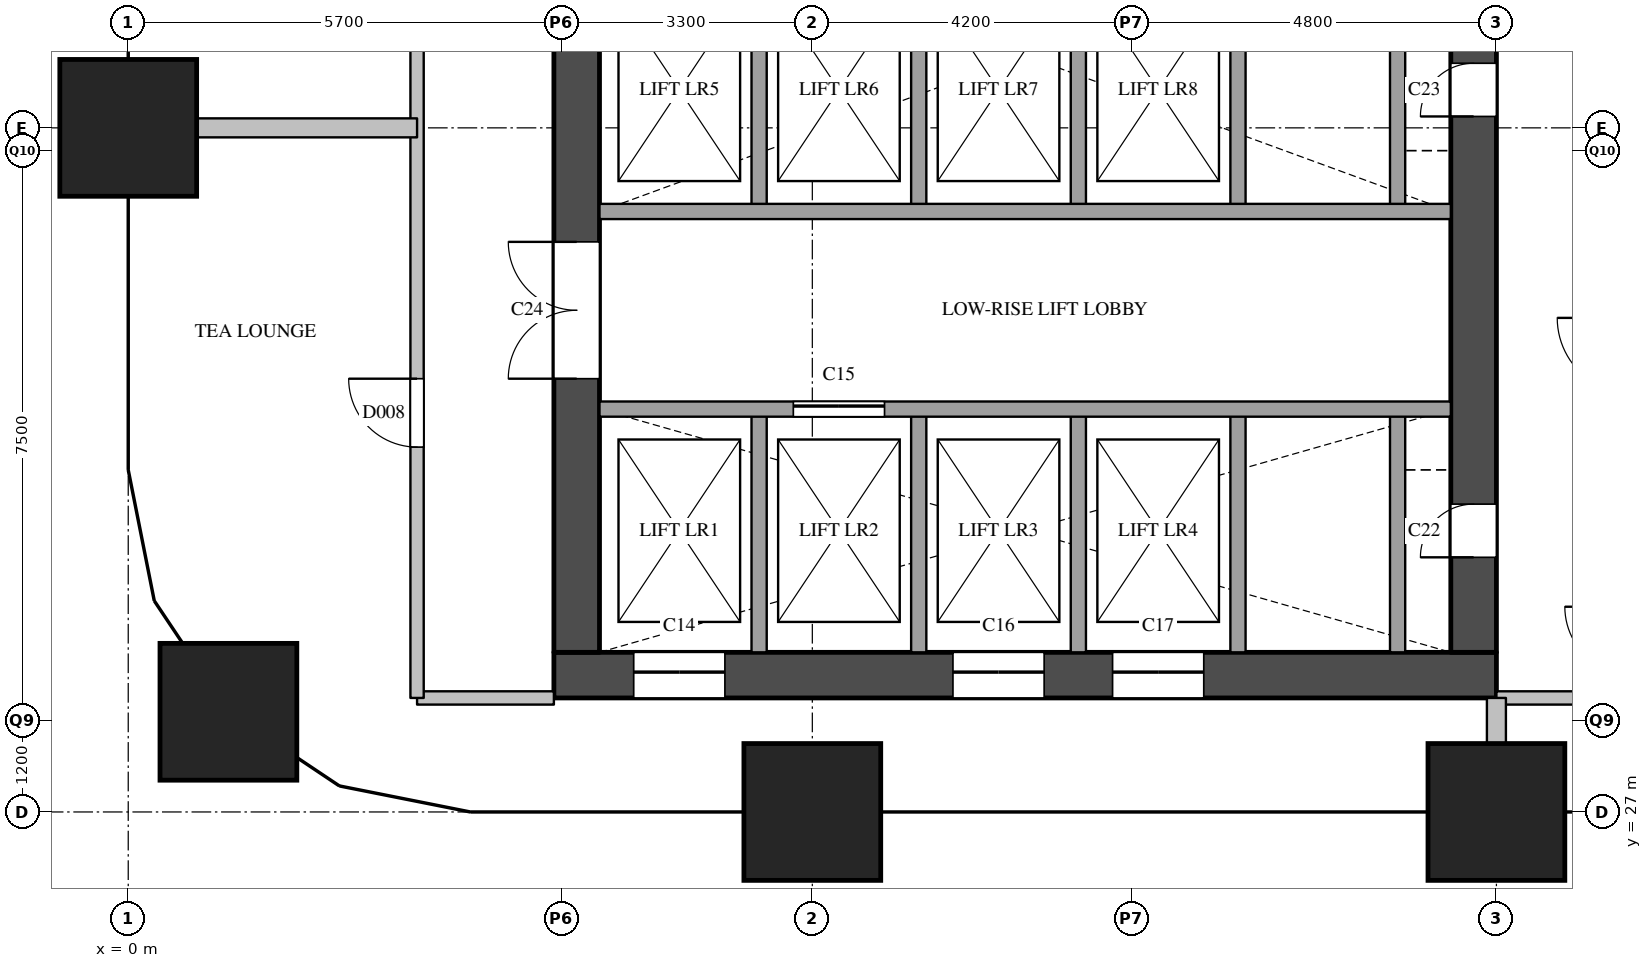
"""IFC4 building model, lengths in metres.
Left out: names, types, materials, properties, quantities, classifications, styles, units other than length and angle.
Written with IfcOpenShell. Run it as: python <this file> out.ifc"""

import sys

from ifc_helpers import new_model, si_unit, direction, frame, frame_2d, origin, origin_2d, place, context, subcontext, project, spatial, rectangle, extrude, element, fill, save


model = new_model("IFC4")
c1 = context("Model", 3, precision=1e-05, world=origin(), true_north=direction((0.0, 1.0)))
c2 = subcontext(c1, "Body", "Model", "MODEL_VIEW")
j1 = project(units=[si_unit("LENGTHUNIT", "METRE"), si_unit("PLANEANGLEUNIT", "RADIAN")], contexts=[c1])
p1 = place(None, origin())
s1 = spatial("IfcSite", under=j1, at=p1, CompositionType="ELEMENT")
p2 = place(p1, origin())
s2 = spatial("IfcBuilding", under=s1, at=p2, CompositionType="ELEMENT")
p3 = place(p2, frame((0.0, 0.0, 115.8)))
s3 = spatial("IfcBuildingStorey", under=s2, at=p3, CompositionType="ELEMENT", Elevation=115.8)
for number, where, z_axis, x_axis in (
    (1, (1.318, 28.318, 0.0), (0.0, 0.0, 1.0), (1.0, 0.0, 0.0)),
    (2, (0.0, 36.0, 0.0), (0.0, 0.0, 1.0), (1.0, 0.0, 0.0)),
    (3, (9.0, 27.0, 0.0), (0.0, 0.0, 1.0), (1.0, 0.0, 0.0)),
    (4, (18.0, 27.0, 0.0), (0.0, 0.0, 1.0), (1.0, 0.0, 0.0)),
):
    element("IfcColumn", number, at=place(p3, frame(where, z_axis=z_axis, x_axis=x_axis)), inside=s3, PredefinedType="COLUMN", context=c2, shape_type="SweptSolid", body=[
        extrude(rectangle(XDim=1.8, YDim=1.8, at=origin_2d()), origin(), (0.0, 0.0, 1.0), 3.8),
    ])
p4 = place(p3, frame((5.6, 28.8, 0.0), z_axis=(0.0, 0.0, 1.0), x_axis=(1.0, 0.0, 0.0)))
e5 = element("IfcWall", 5, at=p4, inside=s3, PredefinedType="SHEAR", context=c2, shape_type="SweptSolid", body=[
    extrude(rectangle(XDim=12.4, YDim=0.6, at=frame_2d((6.2, 0.0))), origin(), (0.0, 0.0, 1.0), 3.5),
])
p5 = place(p4, frame((1.05, 0.0, 0.0)))
e6 = element("IfcOpeningElement", 6, at=p5, cuts=e5, PredefinedType="OPENING", context=c2, shape_type="SweptSolid", body=[
    extrude(rectangle(XDim=1.2, YDim=2.1, at=frame_2d((0.6, 1.05))), frame((0.0, 0.31, 0.0), z_axis=(0.0, -1.0, 0.0), x_axis=(1.0, 0.0, 0.0)), (0.0, 0.0, 1.0), 0.62),
])
p6 = place(p4, frame((5.25, 0.0, 0.0)))
e7 = element("IfcOpeningElement", 7, at=p6, cuts=e5, PredefinedType="OPENING", context=c2, shape_type="SweptSolid", body=[
    extrude(rectangle(XDim=1.2, YDim=2.1, at=frame_2d((0.6, 1.05))), frame((0.0, 0.31, 0.0), z_axis=(0.0, -1.0, 0.0), x_axis=(1.0, 0.0, 0.0)), (0.0, 0.0, 1.0), 0.62),
])
p7 = place(p4, frame((7.35, 0.0, 0.0)))
e8 = element("IfcOpeningElement", 8, at=p7, cuts=e5, PredefinedType="OPENING", context=c2, shape_type="SweptSolid", body=[
    extrude(rectangle(XDim=1.2, YDim=2.1, at=frame_2d((0.6, 1.05))), frame((0.0, 0.31, 0.0), z_axis=(0.0, -1.0, 0.0), x_axis=(1.0, 0.0, 0.0)), (0.0, 0.0, 1.0), 0.62),
])
p8 = place(p3, frame((5.9, 29.1, 0.0), z_axis=(0.0, 0.0, 1.0), x_axis=(0.0, 1.0, 0.0)))
e9 = element("IfcWall", 9, at=p8, inside=s3, PredefinedType="SHEAR", context=c2, shape_type="SweptSolid", body=[
    extrude(rectangle(XDim=20.3, YDim=0.6, at=frame_2d((10.15, 0.0))), origin(), (0.0, 0.0, 1.0), 3.5),
])
p9 = place(p8, frame((3.6, 0.0, 0.0)))
e10 = element("IfcOpeningElement", 10, at=p9, cuts=e9, PredefinedType="OPENING", context=c2, shape_type="SweptSolid", body=[
    extrude(rectangle(XDim=1.8, YDim=2.1, at=frame_2d((0.9, 1.05))), frame((0.0, 0.31, 0.0), z_axis=(0.0, -1.0, 0.0), x_axis=(1.0, 0.0, 0.0)), (0.0, 0.0, 1.0), 0.62),
])
p10 = place(p8, frame((16.4, 0.0, 0.0)))
e11 = element("IfcOpeningElement", 11, at=p10, cuts=e9, PredefinedType="OPENING", context=c2, shape_type="SweptSolid", body=[
    extrude(rectangle(XDim=1.0, YDim=2.1, at=frame_2d((0.5, 1.05))), frame((0.0, 0.31, 0.0), z_axis=(0.0, -1.0, 0.0), x_axis=(1.0, 0.0, 0.0)), (0.0, 0.0, 1.0), 0.62),
])
p11 = place(p3, frame((17.7, 29.1, 0.0), z_axis=(0.0, 0.0, 1.0), x_axis=(0.0, 1.0, 0.0)))
e12 = element("IfcWall", 12, at=p11, inside=s3, PredefinedType="SHEAR", context=c2, shape_type="SweptSolid", body=[
    extrude(rectangle(XDim=20.3, YDim=0.6, at=frame_2d((10.15, 0.0))), origin(), (0.0, 0.0, 1.0), 3.5),
])
p12 = place(p11, frame((1.25, 0.0, 0.0)))
e13 = element("IfcOpeningElement", 13, at=p12, cuts=e12, PredefinedType="OPENING", context=c2, shape_type="SweptSolid", body=[
    extrude(rectangle(XDim=0.7, YDim=2.1, at=frame_2d((0.35, 1.05))), frame((0.0, 0.31, 0.0), z_axis=(0.0, -1.0, 0.0), x_axis=(1.0, 0.0, 0.0)), (0.0, 0.0, 1.0), 0.62),
])
p13 = place(p11, frame((7.05, 0.0, 0.0)))
e14 = element("IfcOpeningElement", 14, at=p13, cuts=e12, PredefinedType="OPENING", context=c2, shape_type="SweptSolid", body=[
    extrude(rectangle(XDim=0.7, YDim=2.1, at=frame_2d((0.35, 1.05))), frame((0.0, 0.31, 0.0), z_axis=(0.0, -1.0, 0.0), x_axis=(1.0, 0.0, 0.0)), (0.0, 0.0, 1.0), 0.62),
])
p14 = place(p3, frame((8.3, 29.1, 0.0), z_axis=(0.0, 0.0, 1.0), x_axis=(0.0, 1.0, 0.0)))
e15 = element("IfcWall", 15, at=p14, inside=s3, PredefinedType="SOLIDWALL", context=c2, shape_type="SweptSolid", body=[
    extrude(rectangle(XDim=3.2, YDim=0.2, at=frame_2d((1.6, 0.0))), origin(), (0.0, 0.0, 1.0), 3.5),
])
p15 = place(p3, frame((8.3, 34.9, 0.0), z_axis=(0.0, 0.0, 1.0), x_axis=(0.0, 1.0, 0.0)))
e16 = element("IfcWall", 16, at=p15, inside=s3, PredefinedType="SOLIDWALL", context=c2, shape_type="SweptSolid", body=[
    extrude(rectangle(XDim=3.2, YDim=0.2, at=frame_2d((1.6, 0.0))), origin(), (0.0, 0.0, 1.0), 3.5),
])
p16 = place(p3, frame((10.4, 29.1, 0.0), z_axis=(0.0, 0.0, 1.0), x_axis=(0.0, 1.0, 0.0)))
e17 = element("IfcWall", 17, at=p16, inside=s3, PredefinedType="SOLIDWALL", context=c2, shape_type="SweptSolid", body=[
    extrude(rectangle(XDim=3.2, YDim=0.2, at=frame_2d((1.6, 0.0))), origin(), (0.0, 0.0, 1.0), 3.5),
])
p17 = place(p3, frame((10.4, 34.9, 0.0), z_axis=(0.0, 0.0, 1.0), x_axis=(0.0, 1.0, 0.0)))
e18 = element("IfcWall", 18, at=p17, inside=s3, PredefinedType="SOLIDWALL", context=c2, shape_type="SweptSolid", body=[
    extrude(rectangle(XDim=3.2, YDim=0.2, at=frame_2d((1.6, 0.0))), origin(), (0.0, 0.0, 1.0), 3.5),
])
p18 = place(p3, frame((12.5, 29.1, 0.0), z_axis=(0.0, 0.0, 1.0), x_axis=(0.0, 1.0, 0.0)))
e19 = element("IfcWall", 19, at=p18, inside=s3, PredefinedType="SOLIDWALL", context=c2, shape_type="SweptSolid", body=[
    extrude(rectangle(XDim=3.2, YDim=0.2, at=frame_2d((1.6, 0.0))), origin(), (0.0, 0.0, 1.0), 3.5),
])
p19 = place(p3, frame((12.5, 34.9, 0.0), z_axis=(0.0, 0.0, 1.0), x_axis=(0.0, 1.0, 0.0)))
e20 = element("IfcWall", 20, at=p19, inside=s3, PredefinedType="SOLIDWALL", context=c2, shape_type="SweptSolid", body=[
    extrude(rectangle(XDim=3.2, YDim=0.2, at=frame_2d((1.6, 0.0))), origin(), (0.0, 0.0, 1.0), 3.5),
])
p20 = place(p3, frame((14.6, 29.1, 0.0), z_axis=(0.0, 0.0, 1.0), x_axis=(0.0, 1.0, 0.0)))
e21 = element("IfcWall", 21, at=p20, inside=s3, PredefinedType="SOLIDWALL", context=c2, shape_type="SweptSolid", body=[
    extrude(rectangle(XDim=3.2, YDim=0.2, at=frame_2d((1.6, 0.0))), origin(), (0.0, 0.0, 1.0), 3.5),
])
p21 = place(p3, frame((14.6, 34.9, 0.0), z_axis=(0.0, 0.0, 1.0), x_axis=(0.0, 1.0, 0.0)))
e22 = element("IfcWall", 22, at=p21, inside=s3, PredefinedType="SOLIDWALL", context=c2, shape_type="SweptSolid", body=[
    extrude(rectangle(XDim=3.2, YDim=0.2, at=frame_2d((1.6, 0.0))), origin(), (0.0, 0.0, 1.0), 3.5),
])
p22 = place(p3, frame((16.7, 29.1, 0.0), z_axis=(0.0, 0.0, 1.0), x_axis=(0.0, 1.0, 0.0)))
e23 = element("IfcWall", 23, at=p22, inside=s3, PredefinedType="SOLIDWALL", context=c2, shape_type="SweptSolid", body=[
    extrude(rectangle(XDim=3.2, YDim=0.2, at=frame_2d((1.6, 0.0))), origin(), (0.0, 0.0, 1.0), 3.5),
])
p23 = place(p3, frame((16.7, 34.9, 0.0), z_axis=(0.0, 0.0, 1.0), x_axis=(0.0, 1.0, 0.0)))
e24 = element("IfcWall", 24, at=p23, inside=s3, PredefinedType="SOLIDWALL", context=c2, shape_type="SweptSolid", body=[
    extrude(rectangle(XDim=3.2, YDim=0.2, at=frame_2d((1.6, 0.0))), origin(), (0.0, 0.0, 1.0), 3.5),
])
p24 = place(p3, frame((6.2, 32.3, 0.0), z_axis=(0.0, 0.0, 1.0), x_axis=(1.0, 0.0, 0.0)))
e25 = element("IfcWall", 25, at=p24, inside=s3, PredefinedType="SOLIDWALL", context=c2, shape_type="SweptSolid", body=[
    extrude(rectangle(XDim=11.2, YDim=0.2, at=frame_2d((5.6, 0.0))), origin(), (0.0, 0.0, 1.0), 3.5),
])
p25 = place(p24, frame((2.55, 0.0, 0.0)))
e26 = element("IfcOpeningElement", 26, at=p25, cuts=e25, PredefinedType="OPENING", context=c2, shape_type="SweptSolid", body=[
    extrude(rectangle(XDim=1.2, YDim=2.1, at=frame_2d((0.6, 1.05))), frame((0.0, 0.11, 0.0), z_axis=(0.0, -1.0, 0.0), x_axis=(1.0, 0.0, 0.0)), (0.0, 0.0, 1.0), 0.22),
])
p26 = place(p3, frame((6.2, 34.9, 0.0), z_axis=(0.0, 0.0, 1.0), x_axis=(1.0, 0.0, 0.0)))
e27 = element("IfcWall", 27, at=p26, inside=s3, PredefinedType="SOLIDWALL", context=c2, shape_type="SweptSolid", body=[
    extrude(rectangle(XDim=11.2, YDim=0.2, at=frame_2d((5.6, 0.0))), origin(), (0.0, 0.0, 1.0), 3.5),
])
for number, where, z_axis, x_axis in (
    (28, (3.8, 28.5, 0.0), (0.0, 0.0, 1.0), (1.0, 0.0, 0.0)),
    (29, (18.0, 28.5, 0.0), (0.0, 0.0, 1.0), (1.0, 0.0, 0.0)),
):
    element("IfcWall", number, at=place(p3, frame(where, z_axis=z_axis, x_axis=x_axis)), inside=s3, PredefinedType="PARTITIONING", context=c2, shape_type="SweptSolid", body=[
        extrude(rectangle(XDim=1.8, YDim=0.175, at=frame_2d((0.9, 0.0))), origin(), (0.0, 0.0, 1.0), 3.5),
    ])
p27 = place(p3, frame((3.8, 28.5, 0.0), z_axis=(0.0, 0.0, 1.0), x_axis=(0.0, 1.0, 0.0)))
e30 = element("IfcWall", 30, at=p27, inside=s3, PredefinedType="PARTITIONING", context=c2, shape_type="SweptSolid", body=[
    extrude(rectangle(XDim=23.3, YDim=0.175, at=frame_2d((11.65, 0.0))), origin(), (0.0, 0.0, 1.0), 3.5),
])
p28 = place(p27, frame((3.3, 0.0, 0.0)))
e31 = element("IfcOpeningElement", 31, at=p28, cuts=e30, PredefinedType="OPENING", context=c2, shape_type="SweptSolid", body=[
    extrude(rectangle(XDim=0.9, YDim=2.1, at=frame_2d((0.45, 1.05))), frame((0.0, 0.097, 0.0), z_axis=(0.0, -1.0, 0.0), x_axis=(1.0, 0.0, 0.0)), (0.0, 0.0, 1.0), 0.195),
])
p29 = place(p27, frame((14.95, 0.0, 0.0)))
e32 = element("IfcOpeningElement", 32, at=p29, cuts=e30, PredefinedType="OPENING", context=c2, shape_type="SweptSolid", body=[
    extrude(rectangle(XDim=0.9, YDim=2.1, at=frame_2d((0.45, 1.05))), frame((0.0, 0.097, 0.0), z_axis=(0.0, -1.0, 0.0), x_axis=(1.0, 0.0, 0.0)), (0.0, 0.0, 1.0), 0.195),
])
p30 = place(p3, frame((0.0, 36.0, 0.0), z_axis=(0.0, 0.0, 1.0), x_axis=(1.0, 0.0, 0.0)))
e33 = element("IfcWall", 33, at=p30, inside=s3, PredefinedType="PARTITIONING", context=c2, shape_type="SweptSolid", body=[
    extrude(rectangle(XDim=3.8, YDim=0.25, at=frame_2d((1.9, 0.0))), origin(), (0.0, 0.0, 1.0), 3.5),
])
p31 = place(p3, frame((18.0, 27.0, 0.0), z_axis=(0.0, 0.0, 1.0), x_axis=(0.0, 1.0, 0.0)))
e34 = element("IfcWall", 34, at=p31, inside=s3, PredefinedType="PARTITIONING", context=c2, shape_type="SweptSolid", body=[
    extrude(rectangle(XDim=1.5, YDim=0.25, at=frame_2d((0.75, 0.0))), origin(), (0.0, 0.0, 1.0), 3.5),
])
p32 = place(p5, origin())
e35 = element("IfcDoor", 35, at=p32, inside=s3, OperationType="SLIDING_TO_LEFT", PredefinedType="DOOR", context=c2, shape_type="SweptSolid", body=[
    extrude(rectangle(XDim=1.2, YDim=2.1, at=frame_2d((0.6, 1.05))), frame((0.0, 0.025, 0.0), z_axis=(0.0, -1.0, 0.0), x_axis=(1.0, 0.0, 0.0)), (0.0, 0.0, 1.0), 0.05),
])
fill(e6, e35)
p33 = place(p25, origin())
e36 = element("IfcDoor", 36, at=p33, inside=s3, OperationType="SLIDING_TO_LEFT", PredefinedType="DOOR", context=c2, shape_type="SweptSolid", body=[
    extrude(rectangle(XDim=1.2, YDim=2.1, at=frame_2d((0.6, 1.05))), frame((0.0, 0.025, 0.0), z_axis=(0.0, -1.0, 0.0), x_axis=(1.0, 0.0, 0.0)), (0.0, 0.0, 1.0), 0.05),
])
fill(e26, e36)
p34 = place(p6, origin())
e37 = element("IfcDoor", 37, at=p34, inside=s3, OperationType="SLIDING_TO_LEFT", PredefinedType="DOOR", context=c2, shape_type="SweptSolid", body=[
    extrude(rectangle(XDim=1.2, YDim=2.1, at=frame_2d((0.6, 1.05))), frame((0.0, 0.025, 0.0), z_axis=(0.0, -1.0, 0.0), x_axis=(1.0, 0.0, 0.0)), (0.0, 0.0, 1.0), 0.05),
])
fill(e7, e37)
p35 = place(p7, origin())
e38 = element("IfcDoor", 38, at=p35, inside=s3, OperationType="SLIDING_TO_LEFT", PredefinedType="DOOR", context=c2, shape_type="SweptSolid", body=[
    extrude(rectangle(XDim=1.2, YDim=2.1, at=frame_2d((0.6, 1.05))), frame((0.0, 0.025, 0.0), z_axis=(0.0, -1.0, 0.0), x_axis=(1.0, 0.0, 0.0)), (0.0, 0.0, 1.0), 0.05),
])
fill(e8, e38)
p36 = place(p12, origin())
e39 = element("IfcDoor", 39, at=p36, inside=s3, OperationType="SINGLE_SWING_LEFT", PredefinedType="DOOR", context=c2, shape_type="SweptSolid", body=[
    extrude(rectangle(XDim=0.7, YDim=2.1, at=frame_2d((0.35, 1.05))), frame((0.0, 0.025, 0.0), z_axis=(0.0, -1.0, 0.0), x_axis=(1.0, 0.0, 0.0)), (0.0, 0.0, 1.0), 0.05),
])
fill(e13, e39)
p37 = place(p13, origin())
e40 = element("IfcDoor", 40, at=p37, inside=s3, OperationType="SINGLE_SWING_LEFT", PredefinedType="DOOR", context=c2, shape_type="SweptSolid", body=[
    extrude(rectangle(XDim=0.7, YDim=2.1, at=frame_2d((0.35, 1.05))), frame((0.0, 0.025, 0.0), z_axis=(0.0, -1.0, 0.0), x_axis=(1.0, 0.0, 0.0)), (0.0, 0.0, 1.0), 0.05),
])
fill(e14, e40)
p38 = place(p9, origin())
e41 = element("IfcDoor", 41, at=p38, inside=s3, OperationType="DOUBLE_DOOR_SINGLE_SWING", PredefinedType="DOOR", context=c2, shape_type="SweptSolid", body=[
    extrude(rectangle(XDim=1.8, YDim=2.1, at=frame_2d((0.9, 1.05))), frame((0.0, 0.025, 0.0), z_axis=(0.0, -1.0, 0.0), x_axis=(1.0, 0.0, 0.0)), (0.0, 0.0, 1.0), 0.05),
])
fill(e10, e41)
p39 = place(p28, origin())
e42 = element("IfcDoor", 42, at=p39, inside=s3, OperationType="SINGLE_SWING_RIGHT", PredefinedType="DOOR", context=c2, shape_type="SweptSolid", body=[
    extrude(rectangle(XDim=0.9, YDim=2.1, at=frame_2d((0.45, 1.05))), frame((0.0, 0.025, 0.0), z_axis=(0.0, -1.0, 0.0), x_axis=(1.0, 0.0, 0.0)), (0.0, 0.0, 1.0), 0.05),
])
fill(e31, e42)
save(model, sys.argv[1])
